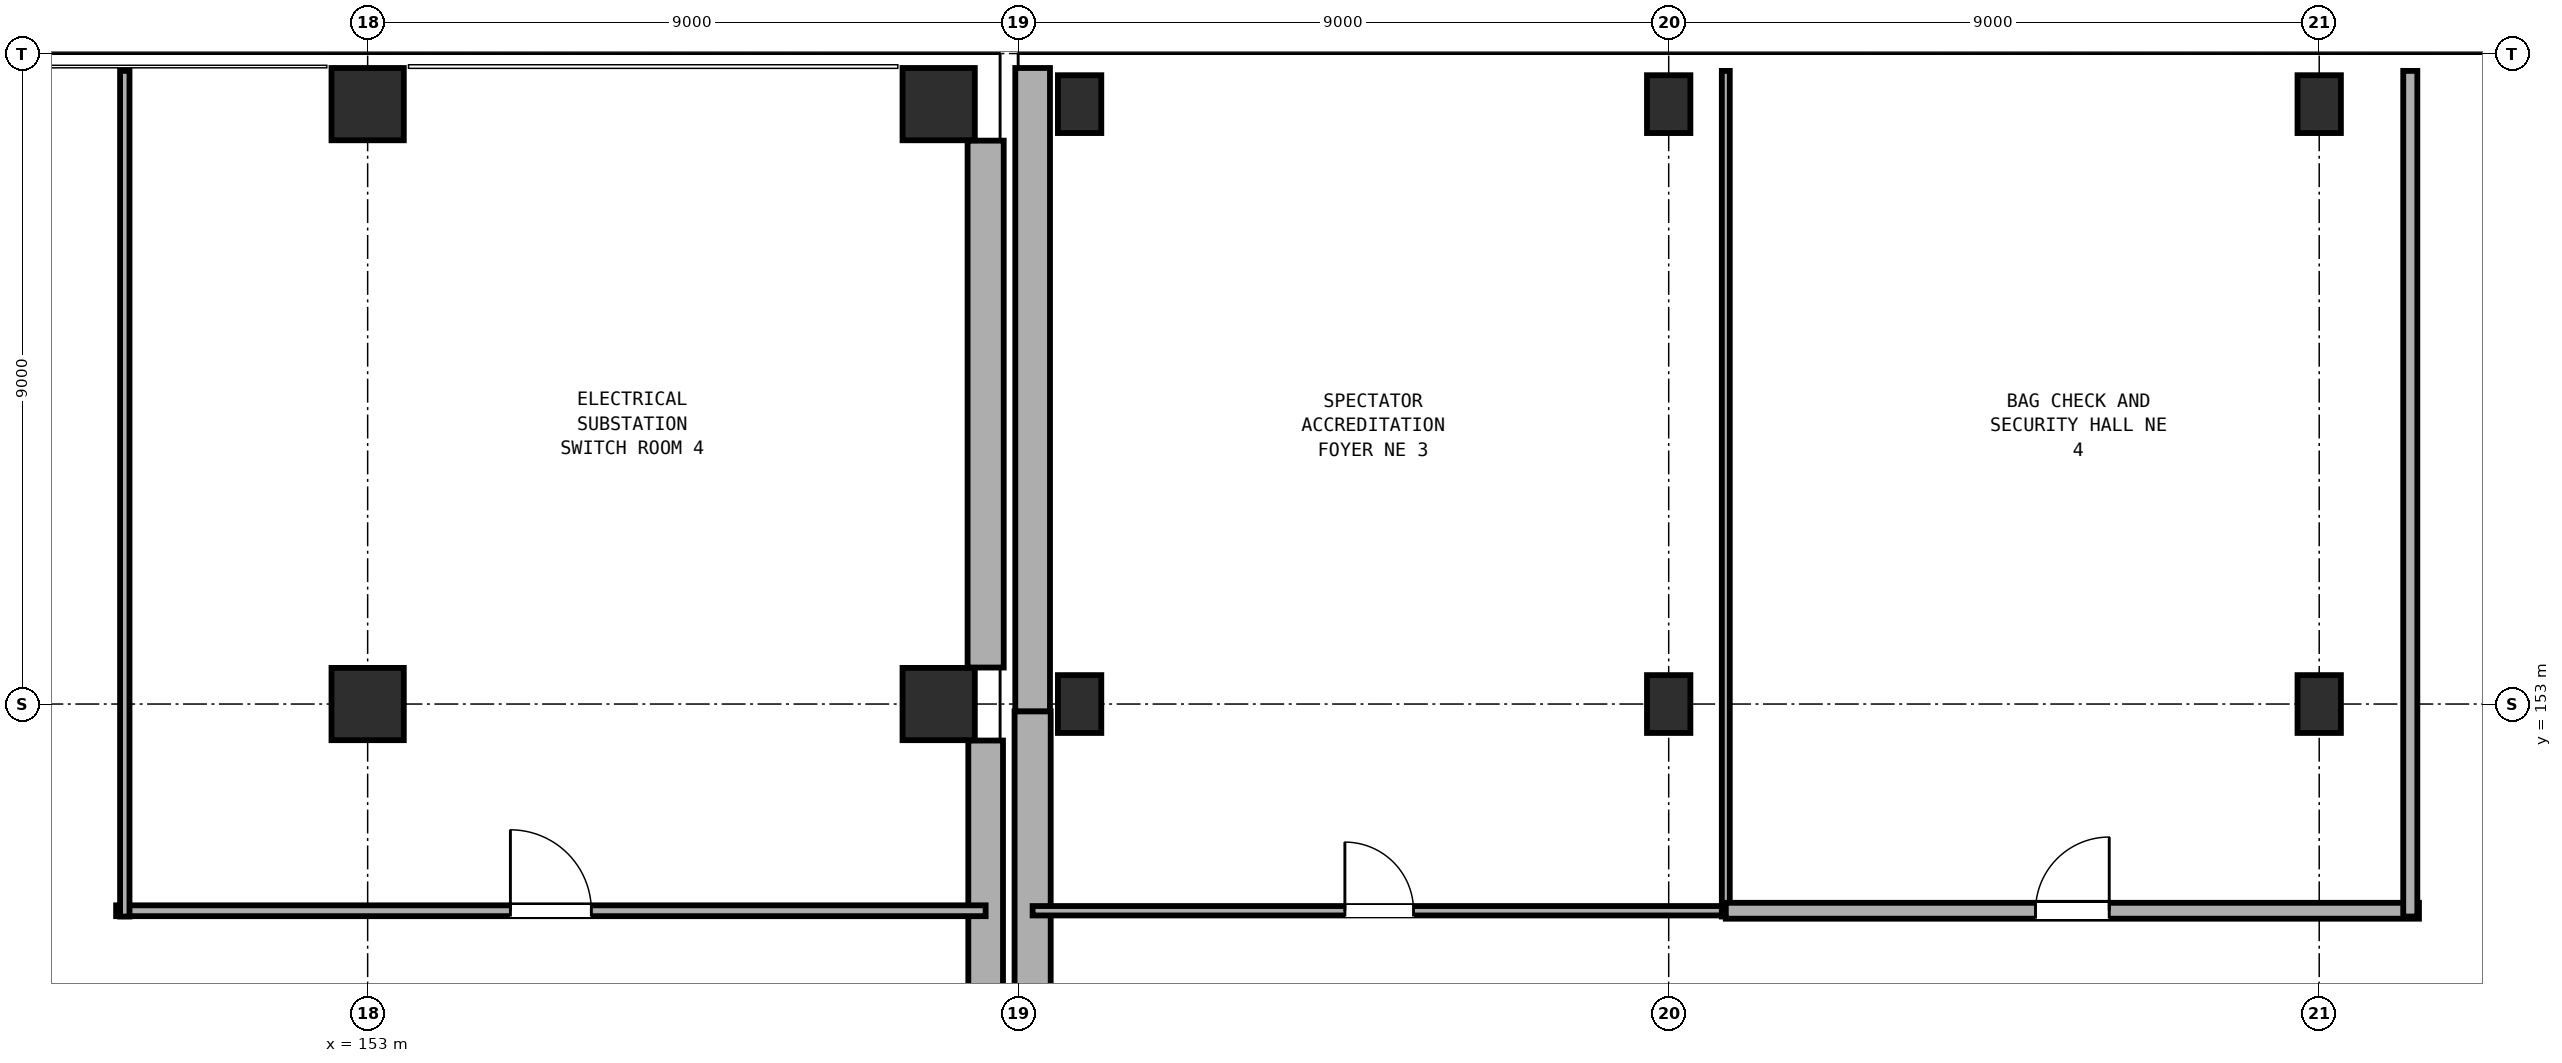
"""IFC4 building model, lengths in metres.
Left out: names, types, materials, properties, quantities, classifications, styles, units other than length and angle.
Written with IfcOpenShell. Run it as: python <this file> out.ifc"""

import sys

from ifc_helpers import new_model, si_unit, direction, frame, frame_2d, origin, origin_2d, place, context, subcontext, project, spatial, rectangle, extrude, element, fill, save


model = new_model("IFC4")
c1 = context("Model", 3, precision=1e-05, world=origin(), true_north=direction((0.0, 1.0)))
c2 = subcontext(c1, "Body", "Model", "MODEL_VIEW")
j1 = project(units=[si_unit("LENGTHUNIT", "METRE"), si_unit("PLANEANGLEUNIT", "RADIAN")], contexts=[c1])
p1 = place(None, origin())
s1 = spatial("IfcSite", under=j1, at=p1, CompositionType="ELEMENT")
p2 = place(p1, origin())
s2 = spatial("IfcBuilding", under=s1, at=p2, CompositionType="ELEMENT")
p3 = place(p2, origin())
s3 = spatial("IfcBuildingStorey", under=s2, at=p3, CompositionType="ELEMENT", Elevation=0.0)
for number, where, z_axis, x_axis in (
    (1, (153.0, 153.0, 0.0), (0.0, 0.0, 1.0), (1.0, 0.0, 0.0)),
    (2, (153.0, 161.3, 0.0), (0.0, 0.0, 1.0), (1.0, 0.0, 0.0)),
    (3, (160.9, 153.0, 0.0), (0.0, 0.0, 1.0), (1.0, 0.0, 0.0)),
    (4, (160.9, 161.3, 0.0), (0.0, 0.0, 1.0), (1.0, 0.0, 0.0)),
):
    element("IfcColumn", number, at=place(p3, frame(where, z_axis=z_axis, x_axis=x_axis)), inside=s3, PredefinedType="COLUMN", context=c2, shape_type="SweptSolid", body=[
        extrude(rectangle(XDim=1.0, YDim=1.0, at=origin_2d()), origin(), (0.0, 0.0, 1.0), 4.8),
    ])
for number, where, z_axis, x_axis in (
    (5, (162.85, 153.0, 0.0), (0.0, 0.0, 1.0), (1.0, 0.0, 0.0)),
    (6, (162.85, 161.3, 0.0), (0.0, 0.0, 1.0), (1.0, 0.0, 0.0)),
    (7, (171.0, 153.0, 0.0), (0.0, 0.0, 1.0), (1.0, 0.0, 0.0)),
    (8, (171.0, 161.3, 0.0), (0.0, 0.0, 1.0), (1.0, 0.0, 0.0)),
    (9, (180.0, 153.0, 0.0), (0.0, 0.0, 1.0), (1.0, 0.0, 0.0)),
    (10, (180.0, 161.3, 0.0), (0.0, 0.0, 1.0), (1.0, 0.0, 0.0)),
):
    element("IfcColumn", number, at=place(p3, frame(where, z_axis=z_axis, x_axis=x_axis)), inside=s3, PredefinedType="COLUMN", context=c2, shape_type="SweptSolid", body=[
        extrude(rectangle(XDim=0.6, YDim=0.8, at=origin_2d()), origin(), (0.0, 0.0, 1.0), 4.8),
    ])
p4 = place(p3, frame((144.505, 161.8, 0.0), z_axis=(0.0, 0.0, 1.0), x_axis=(1.0, 0.0, 0.0)))
e11 = element("IfcWall", 11, at=p4, inside=s3, PredefinedType="SOLIDWALL", context=c2, shape_type="SweptSolid", body=[
    extrude(rectangle(XDim=7.99, YDim=0.31, at=frame_2d((3.995, 0.0))), origin(), (0.0, 0.0, 1.0), 3.58),
])
p5 = place(p4, frame((1.085, 0.0, 0.0)))
e12 = element("IfcOpeningElement", 12, at=p5, cuts=e11, PredefinedType="OPENING", context=c2, shape_type="SweptSolid", body=[
    extrude(rectangle(XDim=3.3, YDim=2.55, at=frame_2d((1.65, 1.275))), frame((0.0, 0.165, 0.0), z_axis=(0.0, -1.0, 0.0), x_axis=(1.0, 0.0, 0.0)), (0.0, 0.0, 1.0), 0.33),
])
p6 = place(p3, frame((153.505, 161.8, 0.0), z_axis=(0.0, 0.0, 1.0), x_axis=(1.0, 0.0, 0.0)))
e13 = element("IfcWall", 13, at=p6, inside=s3, PredefinedType="SOLIDWALL", context=c2, shape_type="SweptSolid", body=[
    extrude(rectangle(XDim=6.89, YDim=0.29, at=frame_2d((3.445, 0.0))), origin(), (0.0, 0.0, 1.0), 3.58),
])
p7 = place(p6, frame((1.845, 0.0, 0.0)))
e14 = element("IfcOpeningElement", 14, at=p7, cuts=e13, PredefinedType="OPENING", context=c2, shape_type="SweptSolid", body=[
    extrude(rectangle(XDim=3.2, YDim=2.5, at=frame_2d((1.6, 1.25))), frame((0.0, 0.155, 0.0), z_axis=(0.0, -1.0, 0.0), x_axis=(1.0, 0.0, 0.0)), (0.0, 0.0, 1.0), 0.31),
])
p8 = place(p3, frame((161.55, 160.795, 0.0), z_axis=(0.0, 0.0, 1.0), x_axis=(0.0, -1.0, 0.0)))
e15 = element("IfcWall", 15, at=p8, inside=s3, PredefinedType="SOLIDWALL", context=c2, shape_type="SweptSolid", body=[
    extrude(rectangle(XDim=7.29, YDim=0.5, at=frame_2d((3.645, 0.0))), origin(), (0.0, 0.0, 1.0), 3.28),
])
p9 = place(p3, frame((161.55, 152.495, 0.0), z_axis=(0.0, 0.0, 1.0), x_axis=(0.0, -1.0, 0.0)))
e16 = element("IfcWall", 16, at=p9, inside=s3, PredefinedType="SOLIDWALL", context=c2, shape_type="SweptSolid", body=[
    extrude(rectangle(XDim=7.99, YDim=0.48, at=frame_2d((3.995, 0.0))), origin(), (0.0, 0.0, 1.0), 3.28),
])
p10 = place(p3, frame((162.2, 144.0, 0.0), z_axis=(0.0, 0.0, 1.0), x_axis=(0.0, 1.0, 0.0)))
e17 = element("IfcWall", 17, at=p10, inside=s3, PredefinedType="SOLIDWALL", context=c2, shape_type="SweptSolid", body=[
    extrude(rectangle(XDim=8.9, YDim=0.5, at=frame_2d((4.45, 0.0))), origin(), (0.0, 0.0, 1.0), 3.28),
])
p11 = place(p3, frame((162.2, 152.9, 0.0), z_axis=(0.0, 0.0, 1.0), x_axis=(0.0, 1.0, 0.0)))
e18 = element("IfcWall", 18, at=p11, inside=s3, PredefinedType="SOLIDWALL", context=c2, shape_type="SweptSolid", body=[
    extrude(rectangle(XDim=8.9, YDim=0.48, at=frame_2d((4.45, 0.0))), origin(), (0.0, 0.0, 1.0), 3.28),
])
p12 = place(p3, frame((163.155, 161.8, 0.0), z_axis=(0.0, 0.0, 1.0), x_axis=(1.0, 0.0, 0.0)))
e19 = element("IfcWall", 19, at=p12, inside=s3, PredefinedType="SOLIDWALL", context=c2, shape_type="SweptSolid", body=[
    extrude(rectangle(XDim=7.54, YDim=0.31, at=frame_2d((3.77, 0.0))), origin(), (0.0, 0.0, 1.0), 3.28),
])
p13 = place(p12, frame((2.795, 0.0, 0.0)))
e20 = element("IfcOpeningElement", 20, at=p13, cuts=e19, PredefinedType="OPENING", context=c2, shape_type="SweptSolid", body=[
    extrude(rectangle(XDim=1.95, YDim=2.1, at=frame_2d((0.975, 1.05))), frame((0.0, 0.165, 0.0), z_axis=(0.0, -1.0, 0.0), x_axis=(1.0, 0.0, 0.0)), (0.0, 0.0, 1.0), 0.33),
])
p14 = place(p3, frame((171.305, 161.8, 0.0), z_axis=(0.0, 0.0, 1.0), x_axis=(1.0, 0.0, 0.0)))
e21 = element("IfcWall", 21, at=p14, inside=s3, PredefinedType="SOLIDWALL", context=c2, shape_type="SweptSolid", body=[
    extrude(rectangle(XDim=8.39, YDim=0.29, at=frame_2d((4.195, 0.0))), origin(), (0.0, 0.0, 1.0), 3.28),
])
p15 = place(p14, frame((2.97, 0.0, 0.0)))
e22 = element("IfcOpeningElement", 22, at=p15, cuts=e21, PredefinedType="OPENING", context=c2, shape_type="SweptSolid", body=[
    extrude(rectangle(XDim=2.45, YDim=2.2, at=frame_2d((1.225, 1.1))), frame((0.0, 0.155, 0.0), z_axis=(0.0, -1.0, 0.0), x_axis=(1.0, 0.0, 0.0)), (0.0, 0.0, 1.0), 0.31),
])
p16 = place(p3, frame((180.305, 161.8, 0.0), z_axis=(0.0, 0.0, 1.0), x_axis=(1.0, 0.0, 0.0)))
e23 = element("IfcWall", 23, at=p16, inside=s3, PredefinedType="SOLIDWALL", context=c2, shape_type="SweptSolid", body=[
    extrude(rectangle(XDim=8.39, YDim=0.5, at=frame_2d((4.195, 0.0))), origin(), (0.0, 0.0, 1.0), 3.58),
])
p17 = place(p16, frame((1.445, 0.0, 0.0)))
e24 = element("IfcOpeningElement", 24, at=p17, cuts=e23, PredefinedType="OPENING", context=c2, shape_type="SweptSolid", body=[
    extrude(rectangle(XDim=3.5, YDim=2.6, at=frame_2d((1.75, 1.3))), frame((0.0, 0.26, 0.0), z_axis=(0.0, -1.0, 0.0), x_axis=(1.0, 0.0, 0.0)), (0.0, 0.0, 1.0), 0.52),
])
p18 = place(p3, frame((149.52, 150.14, 0.0), z_axis=(0.0, 0.0, 1.0), x_axis=(1.0, 0.0, 0.0)))
e25 = element("IfcWall", 25, at=p18, inside=s3, PredefinedType="PARTITIONING", context=c2, shape_type="SweptSolid", body=[
    extrude(rectangle(XDim=12.03, YDim=0.15, at=frame_2d((6.015, 0.0))), origin(), (0.0, 0.0, 1.0), 3.28),
])
p19 = place(p18, frame((5.455, 0.0, 0.0)))
e26 = element("IfcOpeningElement", 26, at=p19, cuts=e25, PredefinedType="OPENING", context=c2, shape_type="SweptSolid", body=[
    extrude(rectangle(XDim=1.12, YDim=2.22, at=frame_2d((0.56, 1.11))), frame((0.0, 0.085, 0.0), z_axis=(0.0, -1.0, 0.0), x_axis=(1.0, 0.0, 0.0)), (0.0, 0.0, 1.0), 0.17),
])
p20 = place(p3, frame((149.64, 150.06, 0.0), z_axis=(0.0, 0.0, 1.0), x_axis=(0.0, 1.0, 0.0)))
e27 = element("IfcWall", 27, at=p20, inside=s3, PredefinedType="PARTITIONING", context=c2, shape_type="SweptSolid", body=[
    extrude(rectangle(XDim=11.7, YDim=0.13, at=frame_2d((5.85, 0.0))), origin(), (0.0, 0.0, 1.0), 3.28),
])
p21 = place(p3, frame((162.2, 150.14, 0.0), z_axis=(0.0, 0.0, 1.0), x_axis=(1.0, 0.0, 0.0)))
e28 = element("IfcWall", 28, at=p21, inside=s3, PredefinedType="PARTITIONING", context=c2, shape_type="SweptSolid", body=[
    extrude(rectangle(XDim=9.59, YDim=0.13, at=frame_2d((4.795, 0.0))), origin(), (0.0, 0.0, 1.0), 3.28),
])
p22 = place(p21, frame((4.32, 0.0, 0.0)))
e29 = element("IfcOpeningElement", 29, at=p22, cuts=e28, PredefinedType="OPENING", context=c2, shape_type="SweptSolid", body=[
    extrude(rectangle(XDim=0.95, YDim=2.18, at=frame_2d((0.475, 1.09))), frame((0.0, 0.075, 0.0), z_axis=(0.0, -1.0, 0.0), x_axis=(1.0, 0.0, 0.0)), (0.0, 0.0, 1.0), 0.15),
])
p23 = place(p3, frame((171.79, 161.76, 0.0), z_axis=(0.0, 0.0, 1.0), x_axis=(0.0, -1.0, 0.0)))
e30 = element("IfcWall", 30, at=p23, inside=s3, PredefinedType="PARTITIONING", context=c2, shape_type="SweptSolid", body=[
    extrude(rectangle(XDim=11.7, YDim=0.11, at=frame_2d((5.85, 0.0))), origin(), (0.0, 0.0, 1.0), 3.28),
])
p24 = place(p3, frame((171.79, 150.14, 0.0), z_axis=(0.0, 0.0, 1.0), x_axis=(1.0, 0.0, 0.0)))
e31 = element("IfcWall", 31, at=p24, inside=s3, PredefinedType="PARTITIONING", context=c2, shape_type="SweptSolid", body=[
    extrude(rectangle(XDim=9.59, YDim=0.22, at=frame_2d((4.795, 0.0))), origin(), (0.0, 0.0, 1.0), 3.28),
])
p25 = place(p24, frame((4.285, 0.0, 0.0)))
e32 = element("IfcOpeningElement", 32, at=p25, cuts=e31, PredefinedType="OPENING", context=c2, shape_type="SweptSolid", body=[
    extrude(rectangle(XDim=1.02, YDim=2.16, at=frame_2d((0.51, 1.08))), frame((0.0, 0.12, 0.0), z_axis=(0.0, -1.0, 0.0), x_axis=(1.0, 0.0, 0.0)), (0.0, 0.0, 1.0), 0.24),
])
p26 = place(p3, frame((181.26, 161.76, 0.0), z_axis=(0.0, 0.0, 1.0), x_axis=(0.0, -1.0, 0.0)))
e33 = element("IfcWall", 33, at=p26, inside=s3, PredefinedType="PARTITIONING", context=c2, shape_type="SweptSolid", body=[
    extrude(rectangle(XDim=11.7, YDim=0.195, at=frame_2d((5.85, 0.0))), origin(), (0.0, 0.0, 1.0), 3.28),
])
p27 = place(p5, origin())
e34 = element("IfcDoor", 34, at=p27, inside=s3, OperationType="DOUBLE_DOOR_SINGLE_SWING", PredefinedType="DOOR", context=c2, shape_type="SweptSolid", body=[
    extrude(rectangle(XDim=3.3, YDim=2.55, at=frame_2d((1.65, 1.275))), frame((0.0, 0.025, 0.0), z_axis=(0.0, -1.0, 0.0), x_axis=(1.0, 0.0, 0.0)), (0.0, 0.0, 1.0), 0.05),
])
fill(e12, e34)
p28 = place(p17, origin())
e35 = element("IfcDoor", 35, at=p28, inside=s3, OperationType="DOUBLE_DOOR_SINGLE_SWING", PredefinedType="DOOR", context=c2, shape_type="SweptSolid", body=[
    extrude(rectangle(XDim=3.5, YDim=2.6, at=frame_2d((1.75, 1.3))), frame((0.0, 0.025, 0.0), z_axis=(0.0, -1.0, 0.0), x_axis=(1.0, 0.0, 0.0)), (0.0, 0.0, 1.0), 0.05),
])
fill(e24, e35)
p29 = place(p7, origin())
e36 = element("IfcDoor", 36, at=p29, inside=s3, OperationType="DOUBLE_DOOR_SINGLE_SWING", PredefinedType="DOOR", context=c2, shape_type="SweptSolid", body=[
    extrude(rectangle(XDim=3.2, YDim=2.5, at=frame_2d((1.6, 1.25))), frame((0.0, 0.025, 0.0), z_axis=(0.0, -1.0, 0.0), x_axis=(1.0, 0.0, 0.0)), (0.0, 0.0, 1.0), 0.05),
])
fill(e14, e36)
p30 = place(p13, origin())
e37 = element("IfcDoor", 37, at=p30, inside=s3, OperationType="DOUBLE_DOOR_SINGLE_SWING", PredefinedType="GATE", context=c2, shape_type="SweptSolid", body=[
    extrude(rectangle(XDim=1.95, YDim=2.1, at=frame_2d((0.975, 1.05))), frame((0.0, 0.025, 0.0), z_axis=(0.0, -1.0, 0.0), x_axis=(1.0, 0.0, 0.0)), (0.0, 0.0, 1.0), 0.05),
])
fill(e20, e37)
p31 = place(p15, origin())
e38 = element("IfcDoor", 38, at=p31, inside=s3, OperationType="DOUBLE_DOOR_SINGLE_SWING", PredefinedType="GATE", context=c2, shape_type="SweptSolid", body=[
    extrude(rectangle(XDim=2.45, YDim=2.2, at=frame_2d((1.225, 1.1))), frame((0.0, 0.025, 0.0), z_axis=(0.0, -1.0, 0.0), x_axis=(1.0, 0.0, 0.0)), (0.0, 0.0, 1.0), 0.05),
])
fill(e22, e38)
p32 = place(p19, origin())
e39 = element("IfcDoor", 39, at=p32, inside=s3, OperationType="SINGLE_SWING_LEFT", PredefinedType="DOOR", context=c2, shape_type="SweptSolid", body=[
    extrude(rectangle(XDim=1.12, YDim=2.22, at=frame_2d((0.56, 1.11))), frame((0.0, 0.025, 0.0), z_axis=(0.0, -1.0, 0.0), x_axis=(1.0, 0.0, 0.0)), (0.0, 0.0, 1.0), 0.05),
])
fill(e26, e39)
p33 = place(p22, origin())
e40 = element("IfcDoor", 40, at=p33, inside=s3, OperationType="SINGLE_SWING_LEFT", PredefinedType="DOOR", context=c2, shape_type="SweptSolid", body=[
    extrude(rectangle(XDim=0.95, YDim=2.18, at=frame_2d((0.475, 1.09))), frame((0.0, 0.025, 0.0), z_axis=(0.0, -1.0, 0.0), x_axis=(1.0, 0.0, 0.0)), (0.0, 0.0, 1.0), 0.05),
])
fill(e29, e40)
p34 = place(p25, origin())
e41 = element("IfcDoor", 41, at=p34, inside=s3, OperationType="SINGLE_SWING_RIGHT", PredefinedType="DOOR", context=c2, shape_type="SweptSolid", body=[
    extrude(rectangle(XDim=1.02, YDim=2.16, at=frame_2d((0.51, 1.08))), frame((0.0, 0.025, 0.0), z_axis=(0.0, -1.0, 0.0), x_axis=(1.0, 0.0, 0.0)), (0.0, 0.0, 1.0), 0.05),
])
fill(e32, e41)
save(model, sys.argv[1])
